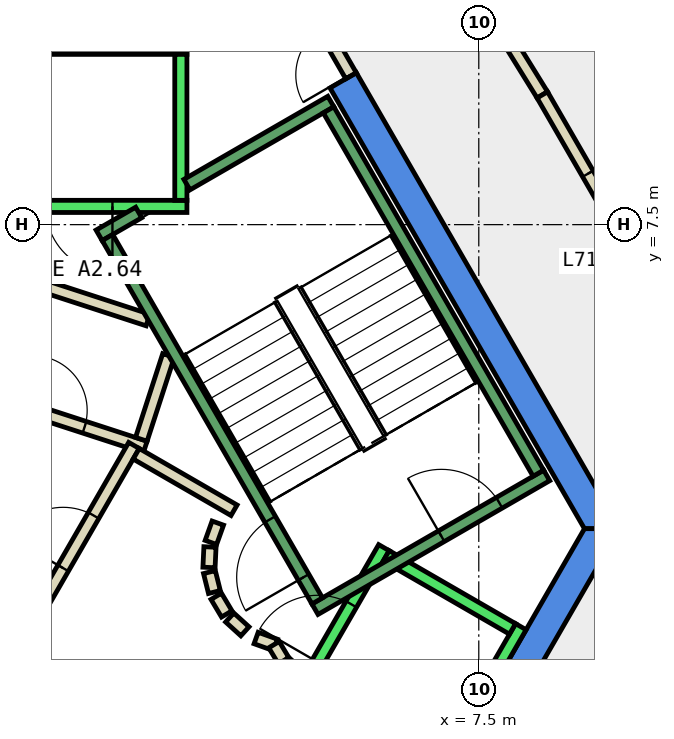
"""IFC4 building model, lengths in metres.
Left out: names, types, materials, properties, quantities, classifications, styles, units other than length and angle.
Written with IfcOpenShell. Run it as: python <this file> out.ifc"""

import sys

from ifc_helpers import new_model, si_unit, direction, frame, frame_2d, origin, place, context, subcontext, project, spatial, polyline, rectangle, outline, extrude, element, fill, save


model = new_model("IFC4")
c1 = context("Model", 3, precision=1e-05, world=origin(), true_north=direction((0.0, 1.0)))
c2 = subcontext(c1, "Body", "Model", "MODEL_VIEW")
j1 = project(units=[si_unit("LENGTHUNIT", "METRE"), si_unit("PLANEANGLEUNIT", "RADIAN")], contexts=[c1])
p1 = place(None, origin())
s1 = spatial("IfcSite", under=j1, at=p1, CompositionType="ELEMENT")
p2 = place(p1, origin())
s2 = spatial("IfcBuilding", under=s1, at=p2, CompositionType="ELEMENT")
p3 = place(p2, frame((0.0, 0.0, 304.4)))
s3 = spatial("IfcBuildingStorey", under=s2, at=p3, CompositionType="ELEMENT", Elevation=304.4)
p4 = place(p3, frame((0.0, 0.0, -0.34)))
e1 = element("IfcWall", 1, at=p4, inside=s3, PredefinedType="SHEAR", context=c2, shape_type="SweptSolid", body=[
    extrude(outline(polyline([(5.486, 9.998), (5.053, 9.748), (9.238, 2.5), (9.815, 2.5), (5.486, 9.998)])), origin(), (0.0, 0.0, 1.0), 3.6),
])
p5 = place(p3, frame((0.0, 0.0, -0.34)))
e2 = element("IfcWall", 2, at=p5, inside=s3, PredefinedType="SHEAR", context=c2, shape_type="SweptSolid", body=[
    extrude(outline(polyline([(4.907, -6.0), (9.815, 2.5), (9.238, 2.5), (4.619, -5.5), (4.907, -6.0)])), origin(), (0.0, 0.0, 1.0), 3.6),
])
p6 = place(p3, frame((2.06, 5.931, 0.0), z_axis=(0.0, 0.0, 1.0), x_axis=(-0.95092855133, 0.309410552932, 0.0)))
e3 = element("IfcWall", 3, at=p6, inside=s3, PredefinedType="PARTITIONING", context=c2, shape_type="SweptSolid", body=[
    extrude(rectangle(XDim=2.399, YDim=0.2, at=frame_2d((1.199, 0.0))), origin(), (0.0, 0.0, 1.0), 3.26),
])
p7 = place(p3, frame((-0.839, 4.771, 0.0), z_axis=(0.0, 0.0, 1.0), x_axis=(0.950961084355, -0.309310549515, 0.0)))
e4 = element("IfcWall", 4, at=p7, inside=s3, PredefinedType="PARTITIONING", context=c2, shape_type="SweptSolid", body=[
    extrude(rectangle(XDim=3.0, YDim=0.2, at=frame_2d((1.5, 0.0))), origin(), (0.0, 0.0, 1.0), 3.26),
])
p8 = place(p7, frame((1.05, 0.0, 0.0)))
e5 = element("IfcOpeningElement", 5, at=p8, cuts=e4, PredefinedType="OPENING", context=c2, shape_type="SweptSolid", body=[
    extrude(rectangle(XDim=0.9, YDim=2.1, at=frame_2d((0.45, 1.05))), frame((0.0, 0.11, 0.0), z_axis=(0.0, -1.0, 0.0), x_axis=(1.0, 0.0, 0.0)), (0.0, 0.0, 1.0), 0.22),
])
p9 = place(p3, frame((1.95, 3.97, 0.0), z_axis=(0.0, 0.0, 1.0), x_axis=(0.308583003896, 0.951197418892, 0.0)))
e6 = element("IfcWall", 6, at=p9, inside=s3, PredefinedType="PARTITIONING", context=c2, shape_type="SweptSolid", body=[
    extrude(rectangle(XDim=1.449, YDim=0.2, at=frame_2d((0.724, 0.0))), origin(), (0.0, 0.0, 1.0), 3.26),
])
p10 = place(p3, frame((6.683, 12.642, 0.0), z_axis=(0.0, 0.0, 1.0), x_axis=(0.526290465295, -0.850304854825, 0.0)))
e7 = element("IfcWall", 7, at=p10, inside=s3, PredefinedType="PARTITIONING", context=c2, shape_type="SweptSolid", body=[
    extrude(rectangle(XDim=3.538, YDim=0.2, at=frame_2d((1.769, 0.0))), origin(), (0.0, 0.0, 1.0), 3.26),
])
p11 = place(p3, frame((8.545, 9.634, 0.0), z_axis=(0.0, 0.0, 1.0), x_axis=(0.50008212199, -0.86597798544, 0.0)))
e8 = element("IfcWall", 8, at=p11, inside=s3, PredefinedType="PARTITIONING", context=c2, shape_type="SweptSolid", body=[
    extrude(rectangle(XDim=3.995, YDim=0.2, at=frame_2d((1.998, 0.0))), origin(), (0.0, 0.0, 1.0), 3.26),
])
p12 = place(p11, frame((1.498, 0.0, 0.0)))
e9 = element("IfcOpeningElement", 9, at=p12, cuts=e8, PredefinedType="OPENING", context=c2, shape_type="SweptSolid", body=[
    extrude(rectangle(XDim=1.0, YDim=2.1, at=frame_2d((0.5, 1.05))), frame((0.0, 0.11, 0.0), z_axis=(0.0, -1.0, 0.0), x_axis=(1.0, 0.0, 0.0)), (0.0, 0.0, 1.0), 0.22),
])
p13 = place(p3, frame((0.05, 0.787, 0.0), z_axis=(0.0, 0.0, 1.0), x_axis=(0.499954076797, 0.866051915934, 0.0)))
e10 = element("IfcWall", 10, at=p13, inside=s3, PredefinedType="PARTITIONING", context=c2, shape_type="SweptSolid", body=[
    extrude(rectangle(XDim=3.558, YDim=0.2, at=frame_2d((1.779, 0.0))), origin(), (0.0, 0.0, 1.0), 3.26),
])
p14 = place(p13, frame((1.229, 0.0, 0.0)))
e11 = element("IfcOpeningElement", 11, at=p14, cuts=e10, PredefinedType="OPENING", context=c2, shape_type="SweptSolid", body=[
    extrude(rectangle(XDim=1.0, YDim=2.1, at=frame_2d((0.5, 1.05))), frame((0.0, 0.11, 0.0), z_axis=(0.0, -1.0, 0.0), x_axis=(1.0, 0.0, 0.0)), (0.0, 0.0, 1.0), 0.22),
])
p15 = place(p3, frame((1.866, 3.732, 0.0), z_axis=(0.0, 0.0, 1.0), x_axis=(0.866043361281, -0.499968895414, 0.0)))
e12 = element("IfcWall", 12, at=p15, inside=s3, PredefinedType="PARTITIONING", context=c2, shape_type="SweptSolid", body=[
    extrude(rectangle(XDim=1.858, YDim=0.2, at=frame_2d((0.929, 0.0))), origin(), (0.0, 0.0, 1.0), 3.26),
])
p16 = place(p3, frame((3.208, 2.592, 0.0), z_axis=(0.0, 0.0, 1.0), x_axis=(-0.337388820924, -0.941365382578, 0.0)))
e13 = element("IfcWall", 13, at=p16, inside=s3, PredefinedType="PARTITIONING", context=c2, shape_type="SweptSolid", body=[
    extrude(rectangle(XDim=0.338, YDim=0.2, at=frame_2d((0.169, 0.0))), origin(), (0.0, 0.0, 1.0), 3.26),
])
p17 = place(p3, frame((3.079, 2.199, 0.0), z_axis=(0.0, 0.0, 1.0), x_axis=(-0.047771483479, -0.998858290933, 0.0)))
e14 = element("IfcWall", 14, at=p17, inside=s3, PredefinedType="PARTITIONING", context=c2, shape_type="SweptSolid", body=[
    extrude(rectangle(XDim=0.337, YDim=0.2, at=frame_2d((0.169, 0.0))), origin(), (0.0, 0.0, 1.0), 3.26),
])
p18 = place(p3, frame((3.07, 1.786, 0.0), z_axis=(0.0, 0.0, 1.0), x_axis=(0.242705583207, -0.970099994784, 0.0)))
e15 = element("IfcWall", 15, at=p18, inside=s3, PredefinedType="PARTITIONING", context=c2, shape_type="SweptSolid", body=[
    extrude(rectangle(XDim=0.338, YDim=0.2, at=frame_2d((0.169, 0.0))), origin(), (0.0, 0.0, 1.0), 3.26),
])
for number, where, z_axis, x_axis in (
    (16, (3.182, 1.388, 0.0), (0.0, 0.0, 1.0), (0.512, -0.859, 0.0)),
    (17, (3.404, 1.039, 0.0), (0.0, 0.0, 1.0), (0.74, -0.672, 0.0)),
):
    element("IfcWall", number, at=place(p3, frame(where, z_axis=z_axis, x_axis=x_axis)), inside=s3, PredefinedType="PARTITIONING", context=c2, shape_type="SweptSolid", body=[
        extrude(rectangle(XDim=0.338, YDim=0.2, at=frame_2d((0.169, 0.0))), origin(), (0.0, 0.0, 1.0), 3.26),
    ])
p19 = place(p3, frame((3.838, 0.702, 0.0), z_axis=(0.0, 0.0, 1.0), x_axis=(0.941035081519, -0.338308993895, 0.0)))
e18 = element("IfcWall", 18, at=p19, inside=s3, PredefinedType="PARTITIONING", context=c2, shape_type="SweptSolid", body=[
    extrude(rectangle(XDim=0.337, YDim=0.2, at=frame_2d((0.168, 0.0))), origin(), (0.0, 0.0, 1.0), 3.26),
])
p20 = place(p3, frame((4.132, 0.593, 0.0), z_axis=(0.0, 0.0, 1.0), x_axis=(0.513561617048, -0.858052717201, 0.0)))
e19 = element("IfcWall", 19, at=p20, inside=s3, PredefinedType="PARTITIONING", context=c2, shape_type="SweptSolid", body=[
    extrude(rectangle(XDim=0.308, YDim=0.2, at=frame_2d((0.154, 0.0))), origin(), (0.0, 0.0, 1.0), 3.26),
])
p21 = place(p3, frame((4.301, 0.315, 0.0), z_axis=(0.0, 0.0, 1.0), x_axis=(0.741798017506, -0.670623367639, 0.0)))
e20 = element("IfcWall", 20, at=p21, inside=s3, PredefinedType="PARTITIONING", context=c2, shape_type="SweptSolid", body=[
    extrude(rectangle(XDim=0.309, YDim=0.2, at=frame_2d((0.154, 0.0))), origin(), (0.0, 0.0, 1.0), 3.26),
])
p22 = place(p3, frame((5.399, 9.948, 0.0), z_axis=(0.0, 0.0, 1.0), x_axis=(-0.499882215713, 0.866093395895, 0.0)))
e21 = element("IfcWall", 21, at=p22, inside=s3, PredefinedType="PARTITIONING", context=c2, shape_type="SweptSolid", body=[
    extrude(rectangle(XDim=0.926, YDim=0.2, at=frame_2d((0.463, 0.0))), origin(), (0.0, 0.0, 1.0), 2.4),
])
p23 = place(p22, frame((0.017, 0.0, 0.0)))
e22 = element("IfcOpeningElement", 22, at=p23, cuts=e21, PredefinedType="OPENING", context=c2, shape_type="SweptSolid", body=[
    extrude(rectangle(XDim=0.9, YDim=2.1, at=frame_2d((0.45, 1.05))), frame((0.0, 0.11, 0.0), z_axis=(0.0, -1.0, 0.0), x_axis=(1.0, 0.0, 0.0)), (0.0, 0.0, 1.0), 0.22),
])
p24 = place(p3, frame((2.7, 7.8, 0.0), z_axis=(0.0, 0.0, 1.0), x_axis=(-1.0, 0.0, 0.0)))
e23 = element("IfcWall", 23, at=p24, inside=s3, PredefinedType="STANDARD", context=c2, shape_type="SweptSolid", body=[
    extrude(rectangle(XDim=5.4, YDim=0.2, at=frame_2d((2.7, 0.0))), origin(), (0.0, 0.0, 1.0), 3.26),
])
p25 = place(p24, frame((1.225, 0.0, 0.0)))
e24 = element("IfcOpeningElement", 24, at=p25, cuts=e23, PredefinedType="OPENING", context=c2, shape_type="SweptSolid", body=[
    extrude(rectangle(XDim=1.1, YDim=2.1, at=frame_2d((0.55, 1.05))), frame((0.0, 0.11, 0.0), z_axis=(0.0, -1.0, 0.0), x_axis=(1.0, 0.0, 0.0)), (0.0, 0.0, 1.0), 0.22),
])
p26 = place(p24, frame((3.075, 0.0, 0.0)))
e25 = element("IfcOpeningElement", 25, at=p26, cuts=e23, PredefinedType="OPENING", context=c2, shape_type="SweptSolid", body=[
    extrude(rectangle(XDim=1.1, YDim=2.1, at=frame_2d((0.55, 1.05))), frame((0.0, 0.11, 0.0), z_axis=(0.0, -1.0, 0.0), x_axis=(1.0, 0.0, 0.0)), (0.0, 0.0, 1.0), 0.22),
])
p27 = place(p3, frame((2.7, 10.4, 0.0), z_axis=(0.0, 0.0, 1.0), x_axis=(-1.0, 0.0, 0.0)))
e26 = element("IfcWall", 26, at=p27, inside=s3, PredefinedType="STANDARD", context=c2, shape_type="SweptSolid", body=[
    extrude(rectangle(XDim=5.4, YDim=0.2, at=frame_2d((2.7, 0.0))), origin(), (0.0, 0.0, 1.0), 3.26),
])
p28 = place(p3, frame((2.6, 7.9, 0.0), z_axis=(0.0, 0.0, 1.0), x_axis=(0.0, 1.0, 0.0)))
e27 = element("IfcWall", 27, at=p28, inside=s3, PredefinedType="STANDARD", context=c2, shape_type="SweptSolid", body=[
    extrude(rectangle(XDim=2.4, YDim=0.2, at=frame_2d((1.2, 0.0))), origin(), (0.0, 0.0, 1.0), 3.26),
])
p29 = place(p3, frame((3.24, -2.488, 0.0), z_axis=(0.0, 0.0, 1.0), x_axis=(0.500034260056, 0.866005622828, 0.0)))
e28 = element("IfcWall", 28, at=p29, inside=s3, PredefinedType="STANDARD", context=c2, shape_type="SweptSolid", body=[
    extrude(rectangle(XDim=5.399, YDim=0.2, at=frame_2d((2.7, 0.0))), origin(), (0.0, 0.0, 1.0), 3.26),
])
p30 = place(p29, frame((3.225, 0.0, 0.0)))
e29 = element("IfcOpeningElement", 29, at=p30, cuts=e28, PredefinedType="OPENING", context=c2, shape_type="SweptSolid", body=[
    extrude(rectangle(XDim=1.1, YDim=2.1, at=frame_2d((0.55, 1.05))), frame((0.0, 0.11, 0.0), z_axis=(0.0, -1.0, 0.0), x_axis=(1.0, 0.0, 0.0)), (0.0, 0.0, 1.0), 0.22),
])
p31 = place(p29, frame((1.225, 0.0, 0.0)))
e30 = element("IfcOpeningElement", 30, at=p31, cuts=e28, PredefinedType="OPENING", context=c2, shape_type="SweptSolid", body=[
    extrude(rectangle(XDim=1.1, YDim=2.1, at=frame_2d((0.55, 1.05))), frame((0.0, 0.11, 0.0), z_axis=(0.0, -1.0, 0.0), x_axis=(1.0, 0.0, 0.0)), (0.0, 0.0, 1.0), 0.22),
])
p32 = place(p3, frame((5.492, -3.788, 0.0), z_axis=(0.0, 0.0, 1.0), x_axis=(0.500034260056, 0.866005622828, 0.0)))
e31 = element("IfcWall", 31, at=p32, inside=s3, PredefinedType="STANDARD", context=c2, shape_type="SweptSolid", body=[
    extrude(rectangle(XDim=5.399, YDim=0.2, at=frame_2d((2.7, 0.0))), origin(), (0.0, 0.0, 1.0), 3.26),
])
p33 = place(p3, frame((5.977, 2.052, 0.0), z_axis=(0.0, 0.0, 1.0), x_axis=(0.865973769406, -0.500089422704, 0.0)))
e32 = element("IfcWall", 32, at=p33, inside=s3, PredefinedType="STANDARD", context=c2, shape_type="SweptSolid", body=[
    extrude(rectangle(XDim=2.399, YDim=0.2, at=frame_2d((1.2, 0.0))), origin(), (0.0, 0.0, 1.0), 3.26),
])
p34 = place(p3, frame((4.806, 1.176, 0.0), z_axis=(0.0, 0.0, 1.0), x_axis=(0.866059941101, 0.499940174841, 0.0)))
e33 = element("IfcWall", 33, at=p34, inside=s3, PredefinedType="STANDARD", context=c2, shape_type="SweptSolid", body=[
    extrude(rectangle(XDim=4.4, YDim=0.2, at=frame_2d((2.2, 0.0))), origin(), (0.0, 0.0, 1.0), 3.26),
])
p35 = place(p34, frame((2.4, 0.0, 0.0)))
e34 = element("IfcOpeningElement", 34, at=p35, cuts=e33, PredefinedType="OPENING", context=c2, shape_type="SweptSolid", body=[
    extrude(rectangle(XDim=1.1, YDim=2.2, at=frame_2d((0.55, 1.1))), frame((0.0, 0.11, 0.0), z_axis=(0.0, -1.0, 0.0), x_axis=(1.0, 0.0, 0.0)), (0.0, 0.0, 1.0), 0.22),
])
p36 = place(p3, frame((2.7, 8.158, 0.0), z_axis=(0.0, 0.0, 1.0), x_axis=(0.86611865017, 0.499838457731, 0.0)))
e35 = element("IfcWall", 35, at=p36, inside=s3, PredefinedType="STANDARD", context=c2, shape_type="SweptSolid", body=[
    extrude(rectangle(XDim=2.733, YDim=0.2, at=frame_2d((1.366, 0.0))), origin(), (0.0, 0.0, 1.0), 3.26),
])
p37 = place(p3, frame((1.256, 7.324, 0.0), z_axis=(0.0, 0.0, 1.0), x_axis=(0.865915093549, 0.500191014278, 0.0)))
e36 = element("IfcWall", 36, at=p37, inside=s3, PredefinedType="STANDARD", context=c2, shape_type="SweptSolid", body=[
    extrude(rectangle(XDim=0.752, YDim=0.2, at=frame_2d((0.376, 0.0))), origin(), (0.0, 0.0, 1.0), 3.26),
])
p38 = place(p3, frame((4.843, 1.312, 0.0), z_axis=(0.0, 0.0, 1.0), x_axis=(-0.499963383562, 0.866046543262, 0.0)))
e37 = element("IfcWall", 37, at=p38, inside=s3, PredefinedType="STANDARD", context=c2, shape_type="SweptSolid", body=[
    extrude(rectangle(XDim=6.9, YDim=0.2, at=frame_2d((3.45, 0.0))), origin(), (0.0, 0.0, 1.0), 3.26),
])
p39 = place(p38, frame((0.45, 0.0, 0.0)))
e38 = element("IfcOpeningElement", 38, at=p39, cuts=e37, PredefinedType="OPENING", context=c2, shape_type="SweptSolid", body=[
    extrude(rectangle(XDim=1.1, YDim=2.2, at=frame_2d((0.55, 1.1))), frame((0.0, 0.11, 0.0), z_axis=(0.0, -1.0, 0.0), x_axis=(1.0, 0.0, 0.0)), (0.0, 0.0, 1.0), 0.22),
])
p40 = place(p3, frame((8.48, 3.412, 0.0), z_axis=(0.0, 0.0, 1.0), x_axis=(-0.499978703459, 0.866037698999, 0.0)))
e39 = element("IfcWall", 39, at=p40, inside=s3, PredefinedType="STANDARD", context=c2, shape_type="SweptSolid", body=[
    extrude(rectangle(XDim=6.9, YDim=0.2, at=frame_2d((3.45, 0.0))), origin(), (0.0, 0.0, 1.0), 3.26),
])
p41 = place(p12, origin())
e40 = element("IfcDoor", 40, at=p41, inside=s3, OperationType="SINGLE_SWING_LEFT", PredefinedType="DOOR", context=c2, shape_type="SweptSolid", body=[
    extrude(rectangle(XDim=1.0, YDim=2.1, at=frame_2d((0.5, 1.05))), frame((0.0, 0.025, 0.0), z_axis=(0.0, -1.0, 0.0), x_axis=(1.0, 0.0, 0.0)), (0.0, 0.0, 1.0), 0.05),
])
fill(e9, e40)
p42 = place(p14, origin())
e41 = element("IfcDoor", 41, at=p42, inside=s3, OperationType="SINGLE_SWING_RIGHT", PredefinedType="DOOR", context=c2, shape_type="SweptSolid", body=[
    extrude(rectangle(XDim=1.0, YDim=2.1, at=frame_2d((0.5, 1.05))), frame((0.0, 0.025, 0.0), z_axis=(0.0, -1.0, 0.0), x_axis=(1.0, 0.0, 0.0)), (0.0, 0.0, 1.0), 0.05),
])
fill(e11, e41)
p43 = place(p8, origin())
e42 = element("IfcDoor", 42, at=p43, inside=s3, OperationType="SINGLE_SWING_LEFT", PredefinedType="DOOR", context=c2, shape_type="SweptSolid", body=[
    extrude(rectangle(XDim=0.9, YDim=2.1, at=frame_2d((0.45, 1.05))), frame((0.0, 0.025, 0.0), z_axis=(0.0, -1.0, 0.0), x_axis=(1.0, 0.0, 0.0)), (0.0, 0.0, 1.0), 0.05),
])
fill(e5, e42)
p44 = place(p23, origin())
e43 = element("IfcDoor", 43, at=p44, inside=s3, OperationType="SINGLE_SWING_LEFT", PredefinedType="DOOR", context=c2, shape_type="SweptSolid", body=[
    extrude(rectangle(XDim=0.9, YDim=2.1, at=frame_2d((0.45, 1.05))), frame((0.0, 0.025, 0.0), z_axis=(0.0, -1.0, 0.0), x_axis=(1.0, 0.0, 0.0)), (0.0, 0.0, 1.0), 0.05),
])
fill(e22, e43)
p45 = place(p25, origin())
e44 = element("IfcDoor", 44, at=p45, inside=s3, OperationType="SLIDING_TO_LEFT", PredefinedType="DOOR", context=c2, shape_type="SweptSolid", body=[
    extrude(rectangle(XDim=1.1, YDim=2.1, at=frame_2d((0.55, 1.05))), frame((0.0, 0.025, 0.0), z_axis=(0.0, -1.0, 0.0), x_axis=(1.0, 0.0, 0.0)), (0.0, 0.0, 1.0), 0.05),
])
fill(e24, e44)
p46 = place(p30, origin())
e45 = element("IfcDoor", 45, at=p46, inside=s3, OperationType="SLIDING_TO_LEFT", PredefinedType="DOOR", context=c2, shape_type="SweptSolid", body=[
    extrude(rectangle(XDim=1.1, YDim=2.1, at=frame_2d((0.55, 1.05))), frame((0.0, 0.025, 0.0), z_axis=(0.0, -1.0, 0.0), x_axis=(1.0, 0.0, 0.0)), (0.0, 0.0, 1.0), 0.05),
])
fill(e29, e45)
p47 = place(p39, origin())
e46 = element("IfcDoor", 46, at=p47, inside=s3, OperationType="SINGLE_SWING_LEFT", PredefinedType="DOOR", context=c2, shape_type="SweptSolid", body=[
    extrude(rectangle(XDim=1.1, YDim=2.2, at=frame_2d((0.55, 1.1))), frame((0.0, 0.025, 0.0), z_axis=(0.0, -1.0, 0.0), x_axis=(1.0, 0.0, 0.0)), (0.0, 0.0, 1.0), 0.05),
])
fill(e38, e46)
p48 = place(p35, origin())
e47 = element("IfcDoor", 47, at=p48, inside=s3, OperationType="SINGLE_SWING_LEFT", PredefinedType="DOOR", context=c2, shape_type="SweptSolid", body=[
    extrude(rectangle(XDim=1.1, YDim=2.2, at=frame_2d((0.55, 1.1))), frame((0.0, 0.025, 0.0), z_axis=(0.0, -1.0, 0.0), x_axis=(1.0, 0.0, 0.0)), (0.0, 0.0, 1.0), 0.05),
])
fill(e34, e47)
save(model, sys.argv[1])
